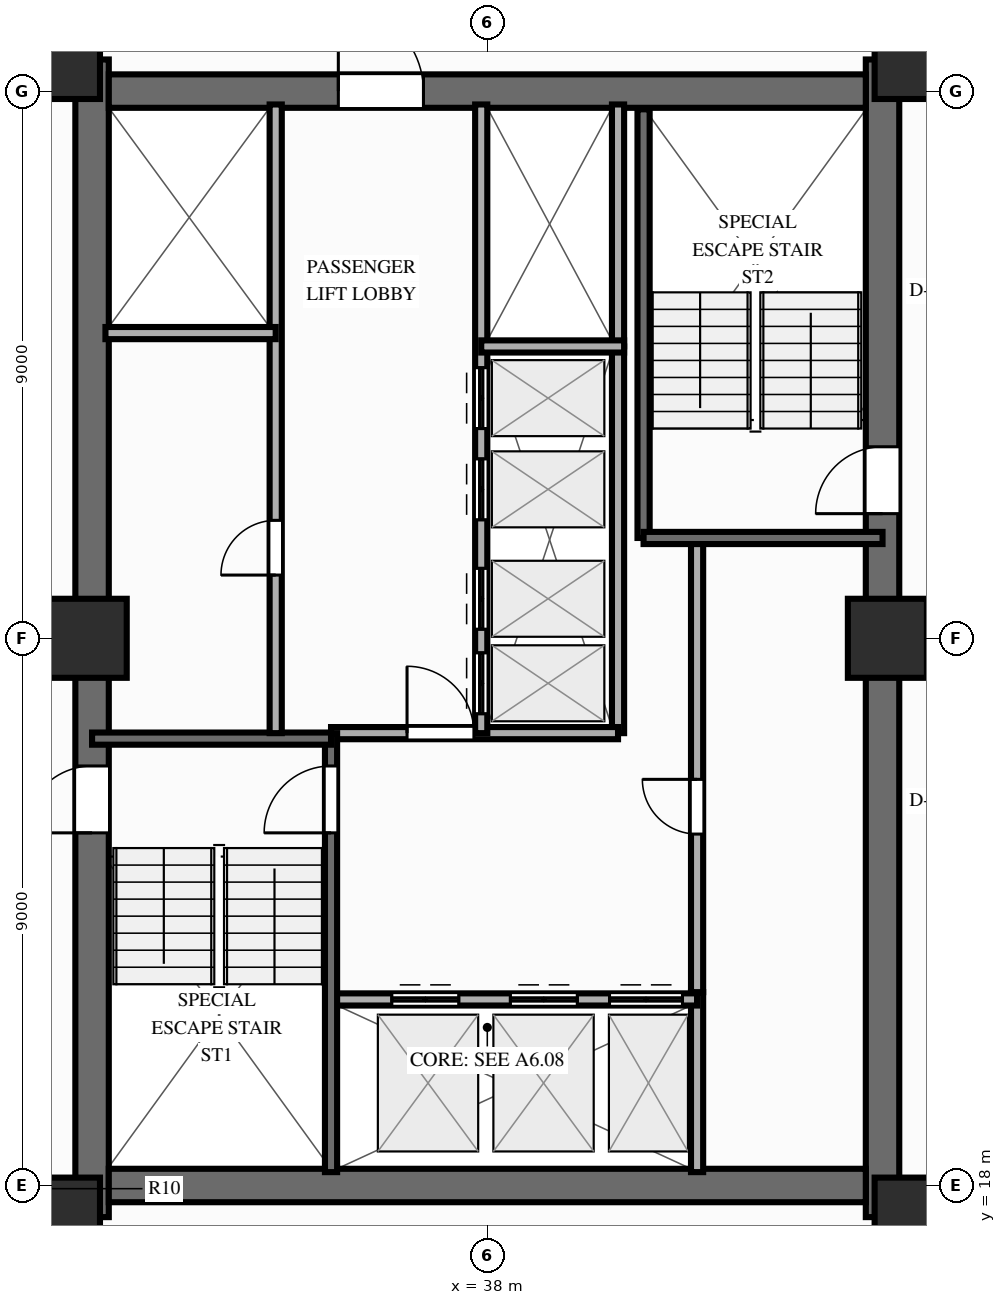
"""IFC4 building model, lengths in metres.
Left out: names, types, materials, properties, quantities, classifications, styles, units other than length and angle.
Written with IfcOpenShell. Run it as: python <this file> out.ifc"""

import sys

from ifc_helpers import new_model, si_unit, direction, frame, frame_2d, origin, origin_2d, place, context, subcontext, project, spatial, rectangle, extrude, source, transform, mapped, element, fill, save


model = new_model("IFC4")
c1 = context("Model", 3, precision=1e-05, world=origin(), true_north=direction((0.0, 1.0)))
c2 = subcontext(c1, "Body", "Model", "MODEL_VIEW")
j1 = project(units=[si_unit("LENGTHUNIT", "METRE"), si_unit("PLANEANGLEUNIT", "RADIAN")], contexts=[c1])
p1 = place(None, origin())
s1 = spatial("IfcSite", under=j1, at=p1, CompositionType="ELEMENT")
p2 = place(p1, origin())
s2 = spatial("IfcBuilding", under=s1, at=p2, CompositionType="ELEMENT")
p3 = place(p2, frame((0.0, 0.0, 116.85)))
s3 = spatial("IfcBuildingStorey", under=s2, at=p3, CompositionType="ELEMENT", Elevation=116.85)
p4 = place(p3, frame((31.5, 17.48, 0.0), z_axis=(0.0, 0.0, 1.0), x_axis=(0.0, 1.0, 0.0)))
e1 = element("IfcWall", 1, at=p4, inside=s3, PredefinedType="SHEAR", context=c2, shape_type="SweptSolid", body=[
    extrude(rectangle(XDim=19.04, YDim=0.55, at=frame_2d((9.52, 0.0))), origin(), (0.0, 0.0, 1.0), 3.0),
])
p5 = place(p4, frame((6.32, 0.0, 0.0)))
e2 = element("IfcOpeningElement", 2, at=p5, cuts=e1, PredefinedType="OPENING", context=c2, shape_type="SweptSolid", body=[
    extrude(rectangle(XDim=1.1, YDim=2.15, at=frame_2d((0.55, 1.075))), frame((0.0, 0.287, 0.0), z_axis=(0.0, -1.0, 0.0), x_axis=(1.0, 0.0, 0.0)), (0.0, 0.0, 1.0), 0.574),
])
p6 = place(p3, frame((44.5, 17.48, 0.0), z_axis=(0.0, 0.0, 1.0), x_axis=(0.0, 1.0, 0.0)))
e3 = element("IfcWall", 3, at=p6, inside=s3, PredefinedType="SHEAR", context=c2, shape_type="SweptSolid", body=[
    extrude(rectangle(XDim=19.04, YDim=0.55, at=frame_2d((9.52, 0.0))), origin(), (0.0, 0.0, 1.0), 3.0),
])
p7 = place(p6, frame((12.67, 0.0, 0.0), z_axis=(0.0, 0.0, 1.0), x_axis=(-1.0, 0.0, 0.0)))
e4 = element("IfcOpeningElement", 4, at=p7, cuts=e3, PredefinedType="OPENING", context=c2, shape_type="SweptSolid", body=[
    extrude(rectangle(XDim=1.1, YDim=2.15, at=frame_2d((0.55, 1.075))), frame((0.0, 0.287, 0.0), z_axis=(0.0, -1.0, 0.0), x_axis=(1.0, 0.0, 0.0)), (0.0, 0.0, 1.0), 0.574),
])
p8 = place(p3, frame((31.775, 18.0, 0.0), z_axis=(0.0, 0.0, 1.0), x_axis=(1.0, 0.0, 0.0)))
e5 = element("IfcWall", 5, at=p8, inside=s3, PredefinedType="SHEAR", context=c2, shape_type="SweptSolid", body=[
    extrude(rectangle(XDim=12.45, YDim=0.55, at=frame_2d((6.225, 0.0))), origin(), (0.0, 0.0, 1.0), 3.0),
])
p9 = place(p3, frame((31.775, 36.0, 0.0), z_axis=(0.0, 0.0, 1.0), x_axis=(1.0, 0.0, 0.0)))
e6 = element("IfcWall", 6, at=p9, inside=s3, PredefinedType="SHEAR", context=c2, shape_type="SweptSolid", body=[
    extrude(rectangle(XDim=12.45, YDim=0.55, at=frame_2d((6.225, 0.0))), origin(), (0.0, 0.0, 1.0), 3.0),
])
p10 = place(p9, frame((5.175, 0.0, 0.0), z_axis=(0.0, 0.0, 1.0), x_axis=(-1.0, 0.0, 0.0)))
e7 = element("IfcOpeningElement", 7, at=p10, cuts=e6, PredefinedType="OPENING", context=c2, shape_type="SweptSolid", body=[
    extrude(rectangle(XDim=1.4, YDim=2.15, at=frame_2d((0.7, 1.075))), frame((0.0, 0.287, 0.0), z_axis=(0.0, -1.0, 0.0), x_axis=(1.0, 0.0, 0.0)), (0.0, 0.0, 1.0), 0.574),
])
m1 = source(origin(), c2, "Body", "SweptSolid", [
    extrude(rectangle(XDim=1.3, YDim=1.3, at=origin_2d()), origin(), (0.0, 0.0, 1.0), 3.0),
])
for number, where, z_axis, x_axis in (
    (8, (30.98, 17.48, 0.0), (0.0, 0.0, 1.0), (1.0, 0.0, 0.0)),
    (9, (45.02, 17.48, 0.0), (0.0, 0.0, 1.0), (1.0, 0.0, 0.0)),
    (10, (30.98, 36.52, 0.0), (0.0, 0.0, 1.0), (1.0, 0.0, 0.0)),
    (11, (45.02, 36.52, 0.0), (0.0, 0.0, 1.0), (1.0, 0.0, 0.0)),
    (12, (31.42, 27.0, 0.0), (0.0, 0.0, 1.0), (1.0, 0.0, 0.0)),
    (13, (44.58, 27.0, 0.0), (0.0, 0.0, 1.0), (1.0, 0.0, 0.0)),
):
    element("IfcColumn", number, at=place(p3, frame(where, z_axis=z_axis, x_axis=x_axis)), inside=s3, PredefinedType="COLUMN", context=c2, shape_type="MappedRepresentation", body=[
        mapped(m1, transform((0.0, 0.0, 0.0), scale=1.0)),
    ])
p11 = place(p3, frame((41.45, 18.22, 0.0), z_axis=(0.0, 0.0, 1.0), x_axis=(0.0, 1.0, 0.0)))
e14 = element("IfcWall", 14, at=p11, inside=s3, PredefinedType="PARTITIONING", context=c2, shape_type="SweptSolid", body=[
    extrude(rectangle(XDim=2.96, YDim=0.2, at=frame_2d((1.48, 0.0))), origin(), (0.0, 0.0, 1.0), 2.79),
])
p12 = place(p3, frame((41.45, 21.18, 0.0), z_axis=(0.0, 0.0, 1.0), x_axis=(0.0, 1.0, 0.0)))
e15 = element("IfcWall", 15, at=p12, inside=s3, PredefinedType="PARTITIONING", context=c2, shape_type="SweptSolid", body=[
    extrude(rectangle(XDim=7.42, YDim=0.2, at=frame_2d((3.71, 0.0))), origin(), (0.0, 0.0, 1.0), 2.79),
])
p13 = place(p12, frame((2.6, 0.0, 0.0)))
e16 = element("IfcOpeningElement", 16, at=p13, cuts=e15, PredefinedType="OPENING", context=c2, shape_type="SweptSolid", body=[
    extrude(rectangle(XDim=0.9, YDim=2.1, at=frame_2d((0.45, 1.05))), frame((0.0, 0.112, 0.0), z_axis=(0.0, -1.0, 0.0), x_axis=(1.0, 0.0, 0.0)), (0.0, 0.0, 1.0), 0.224),
])
p14 = place(p3, frame((40.15, 25.44, 0.0), z_axis=(0.0, 0.0, 1.0), x_axis=(0.0, 1.0, 0.0)))
e17 = element("IfcWall", 17, at=p14, inside=s3, PredefinedType="PARTITIONING", context=c2, shape_type="SweptSolid", body=[
    extrude(rectangle(XDim=6.36, YDim=0.2, at=frame_2d((3.18, 0.0))), origin(), (0.0, 0.0, 1.0), 2.79),
])
p15 = place(p3, frame((40.15, 31.8, 0.0), z_axis=(0.0, 0.0, 1.0), x_axis=(0.0, 1.0, 0.0)))
e18 = element("IfcWall", 18, at=p15, inside=s3, PredefinedType="PARTITIONING", context=c2, shape_type="SweptSolid", body=[
    extrude(rectangle(XDim=3.98, YDim=0.2, at=frame_2d((1.99, 0.0))), origin(), (0.0, 0.0, 1.0), 2.79),
])
p16 = place(p3, frame((35.43, 21.06, 0.0), z_axis=(0.0, 0.0, 1.0), x_axis=(1.0, 0.0, 0.0)))
e19 = element("IfcWall", 19, at=p16, inside=s3, PredefinedType="PARTITIONING", context=c2, shape_type="SweptSolid", body=[
    extrude(rectangle(XDim=6.02, YDim=0.2, at=frame_2d((3.01, 0.0))), origin(), (0.0, 0.0, 1.0), 2.79),
])
p17 = place(p16, frame((1.0, 0.0, 0.0)))
e20 = element("IfcOpeningElement", 20, at=p17, cuts=e19, PredefinedType="OPENING", context=c2, shape_type="SweptSolid", body=[
    extrude(rectangle(XDim=1.1, YDim=2.15, at=frame_2d((0.55, 1.075))), frame((0.0, 0.112, 0.0), z_axis=(0.0, -1.0, 0.0), x_axis=(1.0, 0.0, 0.0)), (0.0, 0.0, 1.0), 0.224),
])
p18 = place(p16, frame((2.95, 0.0, 0.0)))
e21 = element("IfcOpeningElement", 21, at=p18, cuts=e19, PredefinedType="OPENING", context=c2, shape_type="SweptSolid", body=[
    extrude(rectangle(XDim=1.1, YDim=2.15, at=frame_2d((0.55, 1.075))), frame((0.0, 0.112, 0.0), z_axis=(0.0, -1.0, 0.0), x_axis=(1.0, 0.0, 0.0)), (0.0, 0.0, 1.0), 0.224),
])
p19 = place(p16, frame((4.58, 0.0, 0.0)))
e22 = element("IfcOpeningElement", 22, at=p19, cuts=e19, PredefinedType="OPENING", context=c2, shape_type="SweptSolid", body=[
    extrude(rectangle(XDim=1.2, YDim=2.15, at=frame_2d((0.6, 1.075))), frame((0.0, 0.112, 0.0), z_axis=(0.0, -1.0, 0.0), x_axis=(1.0, 0.0, 0.0)), (0.0, 0.0, 1.0), 0.224),
])
p20 = place(p3, frame((35.43, 25.44, 0.0), z_axis=(0.0, 0.0, 1.0), x_axis=(1.0, 0.0, 0.0)))
e23 = element("IfcWall", 23, at=p20, inside=s3, PredefinedType="PARTITIONING", context=c2, shape_type="SweptSolid", body=[
    extrude(rectangle(XDim=4.72, YDim=0.2, at=frame_2d((2.36, 0.0))), origin(), (0.0, 0.0, 1.0), 2.79),
])
p21 = place(p20, frame((1.25, 0.0, 0.0)))
e24 = element("IfcOpeningElement", 24, at=p21, cuts=e23, PredefinedType="OPENING", context=c2, shape_type="SweptSolid", body=[
    extrude(rectangle(XDim=1.1, YDim=2.15, at=frame_2d((0.55, 1.075))), frame((0.0, 0.112, 0.0), z_axis=(0.0, -1.0, 0.0), x_axis=(1.0, 0.0, 0.0)), (0.0, 0.0, 1.0), 0.224),
])
p22 = place(p3, frame((35.43, 18.22, 0.0), z_axis=(0.0, 0.0, 1.0), x_axis=(0.0, 1.0, 0.0)))
e25 = element("IfcWall", 25, at=p22, inside=s3, PredefinedType="SOLIDWALL", context=c2, shape_type="SweptSolid", body=[
    extrude(rectangle(XDim=7.22, YDim=0.2, at=frame_2d((3.61, 0.0))), origin(), (0.0, 0.0, 1.0), 2.79),
])
p23 = place(p22, frame((6.68, 0.0, 0.0), z_axis=(0.0, 0.0, 1.0), x_axis=(-1.0, 0.0, 0.0)))
e26 = element("IfcOpeningElement", 26, at=p23, cuts=e25, PredefinedType="OPENING", context=c2, shape_type="SweptSolid", body=[
    extrude(rectangle(XDim=1.1, YDim=2.15, at=frame_2d((0.55, 1.075))), frame((0.0, 0.112, 0.0), z_axis=(0.0, -1.0, 0.0), x_axis=(1.0, 0.0, 0.0)), (0.0, 0.0, 1.0), 0.224),
])
p24 = place(p3, frame((31.5, 25.35, 0.0), z_axis=(0.0, 0.0, 1.0), x_axis=(1.0, 0.0, 0.0)))
e27 = element("IfcWall", 27, at=p24, inside=s3, PredefinedType="SOLIDWALL", context=c2, shape_type="SweptSolid", body=[
    extrude(rectangle(XDim=3.93, YDim=0.2, at=frame_2d((1.965, 0.0))), origin(), (0.0, 0.0, 1.0), 2.79),
])
p25 = place(p3, frame((40.57, 28.65, 0.0), z_axis=(0.0, 0.0, 1.0), x_axis=(0.0, 1.0, 0.0)))
e28 = element("IfcWall", 28, at=p25, inside=s3, PredefinedType="SOLIDWALL", context=c2, shape_type="SweptSolid", body=[
    extrude(rectangle(XDim=7.05, YDim=0.2, at=frame_2d((3.525, 0.0))), origin(), (0.0, 0.0, 1.0), 2.79),
])
p26 = place(p3, frame((40.57, 28.65, 0.0), z_axis=(0.0, 0.0, 1.0), x_axis=(1.0, 0.0, 0.0)))
e29 = element("IfcWall", 29, at=p26, inside=s3, PredefinedType="SOLIDWALL", context=c2, shape_type="SweptSolid", body=[
    extrude(rectangle(XDim=3.93, YDim=0.2, at=frame_2d((1.965, 0.0))), origin(), (0.0, 0.0, 1.0), 2.79),
])
p27 = place(p3, frame((34.52, 25.44, 0.0), z_axis=(0.0, 0.0, 1.0), x_axis=(0.0, 1.0, 0.0)))
e30 = element("IfcWall", 30, at=p27, inside=s3, PredefinedType="PARTITIONING", context=c2, shape_type="SweptSolid", body=[
    extrude(rectangle(XDim=10.34, YDim=0.2, at=frame_2d((5.17, 0.0))), origin(), (0.0, 0.0, 1.0), 2.79),
])
p28 = place(p27, frame((2.6, 0.0, 0.0)))
e31 = element("IfcOpeningElement", 31, at=p28, cuts=e30, PredefinedType="OPENING", context=c2, shape_type="SweptSolid", body=[
    extrude(rectangle(XDim=0.9, YDim=2.1, at=frame_2d((0.45, 1.05))), frame((0.0, 0.112, 0.0), z_axis=(0.0, -1.0, 0.0), x_axis=(1.0, 0.0, 0.0)), (0.0, 0.0, 1.0), 0.224),
])
p29 = place(p3, frame((31.72, 32.02, 0.0), z_axis=(0.0, 0.0, 1.0), x_axis=(1.0, 0.0, 0.0)))
e32 = element("IfcWall", 32, at=p29, inside=s3, PredefinedType="PARTITIONING", context=c2, shape_type="SweptSolid", body=[
    extrude(rectangle(XDim=2.8, YDim=0.2, at=frame_2d((1.4, 0.0))), origin(), (0.0, 0.0, 1.0), 2.79),
])
p30 = place(p3, frame((37.9, 25.44, 0.0), z_axis=(0.0, 0.0, 1.0), x_axis=(0.0, 1.0, 0.0)))
e33 = element("IfcWall", 33, at=p30, inside=s3, PredefinedType="PARTITIONING", context=c2, shape_type="SweptSolid", body=[
    extrude(rectangle(XDim=10.34, YDim=0.2, at=frame_2d((5.17, 0.0))), origin(), (0.0, 0.0, 1.0), 2.79),
])
p31 = place(p30, frame((0.32, 0.0, 0.0)))
e34 = element("IfcOpeningElement", 34, at=p31, cuts=e33, PredefinedType="OPENING", context=c2, shape_type="SweptSolid", body=[
    extrude(rectangle(XDim=1.0, YDim=2.15, at=frame_2d((0.5, 1.075))), frame((0.0, 0.112, 0.0), z_axis=(0.0, -1.0, 0.0), x_axis=(1.0, 0.0, 0.0)), (0.0, 0.0, 1.0), 0.224),
])
p32 = place(p30, frame((1.71, 0.0, 0.0)))
e35 = element("IfcOpeningElement", 35, at=p32, cuts=e33, PredefinedType="OPENING", context=c2, shape_type="SweptSolid", body=[
    extrude(rectangle(XDim=1.0, YDim=2.15, at=frame_2d((0.5, 1.075))), frame((0.0, 0.112, 0.0), z_axis=(0.0, -1.0, 0.0), x_axis=(1.0, 0.0, 0.0)), (0.0, 0.0, 1.0), 0.224),
])
p33 = place(p30, frame((3.51, 0.0, 0.0)))
e36 = element("IfcOpeningElement", 36, at=p33, cuts=e33, PredefinedType="OPENING", context=c2, shape_type="SweptSolid", body=[
    extrude(rectangle(XDim=1.0, YDim=2.15, at=frame_2d((0.5, 1.075))), frame((0.0, 0.112, 0.0), z_axis=(0.0, -1.0, 0.0), x_axis=(1.0, 0.0, 0.0)), (0.0, 0.0, 1.0), 0.224),
])
p34 = place(p30, frame((5.01, 0.0, 0.0)))
e37 = element("IfcOpeningElement", 37, at=p34, cuts=e33, PredefinedType="OPENING", context=c2, shape_type="SweptSolid", body=[
    extrude(rectangle(XDim=1.0, YDim=2.15, at=frame_2d((0.5, 1.075))), frame((0.0, 0.112, 0.0), z_axis=(0.0, -1.0, 0.0), x_axis=(1.0, 0.0, 0.0)), (0.0, 0.0, 1.0), 0.224),
])
p35 = place(p3, frame((37.9, 31.8, 0.0), z_axis=(0.0, 0.0, 1.0), x_axis=(1.0, 0.0, 0.0)))
e38 = element("IfcWall", 38, at=p35, inside=s3, PredefinedType="PARTITIONING", context=c2, shape_type="SweptSolid", body=[
    extrude(rectangle(XDim=2.35, YDim=0.2, at=frame_2d((1.175, 0.0))), origin(), (0.0, 0.0, 1.0), 2.79),
])
m2 = source(origin(), c2, "Body", "SweptSolid", [
    extrude(rectangle(XDim=1.1, YDim=2.15, at=frame_2d((0.55, 1.075))), frame((0.0, 0.025, 0.0), z_axis=(0.0, -1.0, 0.0), x_axis=(1.0, 0.0, 0.0)), (0.0, 0.0, 1.0), 0.05),
])
p36 = place(p5, origin())
e39 = element("IfcDoor", 39, at=p36, inside=s3, OperationType="SINGLE_SWING_LEFT", PredefinedType="DOOR", context=c2, shape_type="MappedRepresentation", body=[
    mapped(m2, transform((0.0, 0.0, 0.0), scale=1.0)),
])
fill(e2, e39)
p37 = place(p7, origin())
e40 = element("IfcDoor", 40, at=p37, inside=s3, OperationType="SINGLE_SWING_RIGHT", PredefinedType="DOOR", context=c2, shape_type="MappedRepresentation", body=[
    mapped(m2, transform((0.0, 0.0, 0.0), scale=1.0)),
])
fill(e4, e40)
m3 = source(origin(), c2, "Body", "SweptSolid", [
    extrude(rectangle(XDim=1.4, YDim=2.15, at=frame_2d((0.7, 1.075))), frame((0.0, 0.025, 0.0), z_axis=(0.0, -1.0, 0.0), x_axis=(1.0, 0.0, 0.0)), (0.0, 0.0, 1.0), 0.05),
])
p38 = place(p10, origin())
e41 = element("IfcDoor", 41, at=p38, inside=s3, OperationType="SINGLE_SWING_RIGHT", PredefinedType="DOOR", context=c2, shape_type="MappedRepresentation", body=[
    mapped(m3, transform((0.0, 0.0, 0.0), scale=1.0)),
])
fill(e7, e41)
m4 = source(origin(), c2, "Body", "SweptSolid", [
    extrude(rectangle(XDim=0.9, YDim=2.1, at=frame_2d((0.45, 1.05))), frame((0.0, 0.025, 0.0), z_axis=(0.0, -1.0, 0.0), x_axis=(1.0, 0.0, 0.0)), (0.0, 0.0, 1.0), 0.05),
])
p39 = place(p13, origin())
e42 = element("IfcDoor", 42, at=p39, inside=s3, OperationType="SINGLE_SWING_RIGHT", PredefinedType="DOOR", context=c2, shape_type="MappedRepresentation", body=[
    mapped(m4, transform((0.0, 0.0, 0.0), scale=1.0)),
])
fill(e16, e42)
p40 = place(p17, origin())
e43 = element("IfcDoor", 43, at=p40, inside=s3, OperationType="DOUBLE_DOOR_SLIDING", PredefinedType="DOOR", context=c2, shape_type="MappedRepresentation", body=[
    mapped(m2, transform((0.0, 0.0, 0.0), scale=1.0)),
])
fill(e20, e43)
p41 = place(p18, origin())
e44 = element("IfcDoor", 44, at=p41, inside=s3, OperationType="DOUBLE_DOOR_SLIDING", PredefinedType="DOOR", context=c2, shape_type="MappedRepresentation", body=[
    mapped(m2, transform((0.0, 0.0, 0.0), scale=1.0)),
])
fill(e21, e44)
m5 = source(origin(), c2, "Body", "SweptSolid", [
    extrude(rectangle(XDim=1.2, YDim=2.15, at=frame_2d((0.6, 1.075))), frame((0.0, 0.025, 0.0), z_axis=(0.0, -1.0, 0.0), x_axis=(1.0, 0.0, 0.0)), (0.0, 0.0, 1.0), 0.05),
])
p42 = place(p19, origin())
e45 = element("IfcDoor", 45, at=p42, inside=s3, OperationType="DOUBLE_DOOR_SLIDING", PredefinedType="DOOR", context=c2, shape_type="MappedRepresentation", body=[
    mapped(m5, transform((0.0, 0.0, 0.0), scale=1.0)),
])
fill(e22, e45)
p43 = place(p21, origin())
e46 = element("IfcDoor", 46, at=p43, inside=s3, OperationType="SINGLE_SWING_LEFT", PredefinedType="DOOR", context=c2, shape_type="MappedRepresentation", body=[
    mapped(m2, transform((0.0, 0.0, 0.0), scale=1.0)),
])
fill(e24, e46)
p44 = place(p23, origin())
e47 = element("IfcDoor", 47, at=p44, inside=s3, OperationType="SINGLE_SWING_RIGHT", PredefinedType="DOOR", context=c2, shape_type="MappedRepresentation", body=[
    mapped(m2, transform((0.0, 0.0, 0.0), scale=1.0)),
])
fill(e26, e47)
p45 = place(p28, origin())
e48 = element("IfcDoor", 48, at=p45, inside=s3, OperationType="SINGLE_SWING_LEFT", PredefinedType="DOOR", context=c2, shape_type="MappedRepresentation", body=[
    mapped(m4, transform((0.0, 0.0, 0.0), scale=1.0)),
])
fill(e31, e48)
m6 = source(origin(), c2, "Body", "SweptSolid", [
    extrude(rectangle(XDim=1.0, YDim=2.15, at=frame_2d((0.5, 1.075))), frame((0.0, 0.025, 0.0), z_axis=(0.0, -1.0, 0.0), x_axis=(1.0, 0.0, 0.0)), (0.0, 0.0, 1.0), 0.05),
])
p46 = place(p31, origin())
e49 = element("IfcDoor", 49, at=p46, inside=s3, OperationType="DOUBLE_DOOR_SLIDING", PredefinedType="DOOR", context=c2, shape_type="MappedRepresentation", body=[
    mapped(m6, transform((0.0, 0.0, 0.0), scale=1.0)),
])
fill(e34, e49)
p47 = place(p32, origin())
e50 = element("IfcDoor", 50, at=p47, inside=s3, OperationType="DOUBLE_DOOR_SLIDING", PredefinedType="DOOR", context=c2, shape_type="MappedRepresentation", body=[
    mapped(m6, transform((0.0, 0.0, 0.0), scale=1.0)),
])
fill(e35, e50)
p48 = place(p33, origin())
e51 = element("IfcDoor", 51, at=p48, inside=s3, OperationType="DOUBLE_DOOR_SLIDING", PredefinedType="DOOR", context=c2, shape_type="MappedRepresentation", body=[
    mapped(m6, transform((0.0, 0.0, 0.0), scale=1.0)),
])
fill(e36, e51)
p49 = place(p34, origin())
e52 = element("IfcDoor", 52, at=p49, inside=s3, OperationType="DOUBLE_DOOR_SLIDING", PredefinedType="DOOR", context=c2, shape_type="MappedRepresentation", body=[
    mapped(m6, transform((0.0, 0.0, 0.0), scale=1.0)),
])
fill(e37, e52)
save(model, sys.argv[1])
